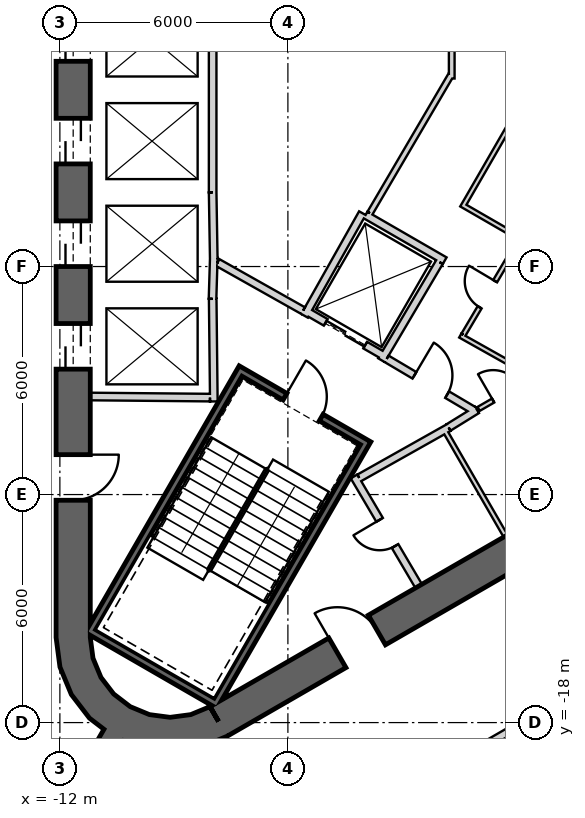
"""IFC4 building model, lengths in metres.
Left out: names, types, materials, properties, quantities, classifications, styles, units other than length and angle.
Written with IfcOpenShell. Run it as: python <this file> out.ifc"""

import sys

from ifc_helpers import new_model, si_unit, direction, frame, frame_2d, origin, place, context, subcontext, project, spatial, polyline, rectangle, outline, extrude, element, fill, save


model = new_model("IFC4")
c1 = context("Model", 3, precision=1e-05, world=origin(), true_north=direction((0.0, 1.0)))
c2 = subcontext(c1, "Body", "Model", "MODEL_VIEW")
j1 = project(units=[si_unit("LENGTHUNIT", "METRE"), si_unit("PLANEANGLEUNIT", "RADIAN")], contexts=[c1])
p1 = place(None, origin())
s1 = spatial("IfcSite", under=j1, at=p1, CompositionType="ELEMENT")
p2 = place(p1, origin())
s2 = spatial("IfcBuilding", under=s1, at=p2, CompositionType="ELEMENT")
p3 = place(p2, frame((0.0, 0.0, 310.4)))
s3 = spatial("IfcBuildingStorey", under=s2, at=p3, CompositionType="ELEMENT", Elevation=310.4)
p4 = place(p3, frame((-11.65, 15.762, 0.0), z_axis=(0.0, 0.0, 1.0), x_axis=(0.0, -1.0, 0.0)))
e1 = element("IfcWall", 1, at=p4, inside=s3, PredefinedType="SHEAR", context=c2, shape_type="SweptSolid", body=[
    extrude(rectangle(XDim=31.523, YDim=0.9, at=frame_2d((15.762, 0.0))), origin(), (0.0, 0.0, 1.0), 3.9),
])
p5 = place(p4, frame((7.062, 0.0, 0.0)))
e2 = element("IfcOpeningElement", 2, at=p5, cuts=e1, PredefinedType="OPENING", context=c2, shape_type="SweptSolid", body=[
    extrude(rectangle(XDim=1.2, YDim=2.4, at=frame_2d((0.6, 1.2))), frame((0.0, 0.46, 0.0), z_axis=(0.0, -1.0, 0.0), x_axis=(1.0, 0.0, 0.0)), (0.0, 0.0, 1.0), 0.92),
])
p6 = place(p4, frame((9.762, 0.0, 0.0)))
e3 = element("IfcOpeningElement", 3, at=p6, cuts=e1, PredefinedType="OPENING", context=c2, shape_type="SweptSolid", body=[
    extrude(rectangle(XDim=1.2, YDim=2.4, at=frame_2d((0.6, 1.2))), frame((0.0, 0.46, 0.0), z_axis=(0.0, -1.0, 0.0), x_axis=(1.0, 0.0, 0.0)), (0.0, 0.0, 1.0), 0.92),
])
p7 = place(p4, frame((12.462, 0.0, 0.0)))
e4 = element("IfcOpeningElement", 4, at=p7, cuts=e1, PredefinedType="OPENING", context=c2, shape_type="SweptSolid", body=[
    extrude(rectangle(XDim=1.2, YDim=2.4, at=frame_2d((0.6, 1.2))), frame((0.0, 0.46, 0.0), z_axis=(0.0, -1.0, 0.0), x_axis=(1.0, 0.0, 0.0)), (0.0, 0.0, 1.0), 0.92),
])
p8 = place(p4, frame((15.162, 0.0, 0.0)))
e5 = element("IfcOpeningElement", 5, at=p8, cuts=e1, PredefinedType="OPENING", context=c2, shape_type="SweptSolid", body=[
    extrude(rectangle(XDim=1.2, YDim=2.4, at=frame_2d((0.6, 1.2))), frame((0.0, 0.46, 0.0), z_axis=(0.0, -1.0, 0.0), x_axis=(1.0, 0.0, 0.0)), (0.0, 0.0, 1.0), 0.92),
])
p9 = place(p4, frame((17.862, 0.0, 0.0)))
e6 = element("IfcOpeningElement", 6, at=p9, cuts=e1, PredefinedType="OPENING", context=c2, shape_type="SweptSolid", body=[
    extrude(rectangle(XDim=1.2, YDim=2.4, at=frame_2d((0.6, 1.2))), frame((0.0, 0.46, 0.0), z_axis=(0.0, -1.0, 0.0), x_axis=(1.0, 0.0, 0.0)), (0.0, 0.0, 1.0), 0.92),
])
p10 = place(p4, frame((20.562, 0.0, 0.0)))
e7 = element("IfcOpeningElement", 7, at=p10, cuts=e1, PredefinedType="OPENING", context=c2, shape_type="SweptSolid", body=[
    extrude(rectangle(XDim=1.2, YDim=2.4, at=frame_2d((0.6, 1.2))), frame((0.0, 0.46, 0.0), z_axis=(0.0, -1.0, 0.0), x_axis=(1.0, 0.0, 0.0)), (0.0, 0.0, 1.0), 0.92),
])
p11 = place(p4, frame((23.262, 0.0, 0.0)))
e8 = element("IfcOpeningElement", 8, at=p11, cuts=e1, PredefinedType="OPENING", context=c2, shape_type="SweptSolid", body=[
    extrude(rectangle(XDim=1.2, YDim=2.4, at=frame_2d((0.6, 1.2))), frame((0.0, 0.46, 0.0), z_axis=(0.0, -1.0, 0.0), x_axis=(1.0, 0.0, 0.0)), (0.0, 0.0, 1.0), 0.92),
])
p12 = place(p4, frame((3.612, 0.0, 0.0)))
e9 = element("IfcOpeningElement", 9, at=p12, cuts=e1, PredefinedType="OPENING", context=c2, shape_type="SweptSolid", body=[
    extrude(rectangle(XDim=1.2, YDim=2.4, at=frame_2d((0.6, 1.2))), frame((0.0, 0.46, 0.0), z_axis=(0.0, -1.0, 0.0), x_axis=(1.0, 0.0, 0.0)), (0.0, 0.0, 1.0), 0.92),
])
p13 = place(p4, frame((26.712, 0.0, 0.0)))
e10 = element("IfcOpeningElement", 10, at=p13, cuts=e1, PredefinedType="OPENING", context=c2, shape_type="SweptSolid", body=[
    extrude(rectangle(XDim=1.2, YDim=2.4, at=frame_2d((0.6, 1.2))), frame((0.0, 0.46, 0.0), z_axis=(0.0, -1.0, 0.0), x_axis=(1.0, 0.0, 0.0)), (0.0, 0.0, 1.0), 0.92),
])
p14 = place(p3, frame((-7.825, -17.97, 0.0), z_axis=(0.0, 0.0, 1.0), x_axis=(0.866028369851, 0.499994862586, 0.0)))
e11 = element("IfcWall", 11, at=p14, inside=s3, PredefinedType="SHEAR", context=c2, shape_type="SweptSolid", body=[
    extrude(rectangle(XDim=31.523, YDim=0.9, at=frame_2d((15.762, 0.0))), origin(), (0.0, 0.0, 1.0), 3.9),
])
p15 = place(p14, frame((17.862, 0.0, 0.0)))
e12 = element("IfcOpeningElement", 12, at=p15, cuts=e11, PredefinedType="OPENING", context=c2, shape_type="SweptSolid", body=[
    extrude(rectangle(XDim=1.2, YDim=2.4, at=frame_2d((0.6, 1.2))), frame((0.0, 0.46, 0.0), z_axis=(0.0, -1.0, 0.0), x_axis=(1.0, 0.0, 0.0)), (0.0, 0.0, 1.0), 0.92),
])
p16 = place(p14, frame((20.562, 0.0, 0.0)))
e13 = element("IfcOpeningElement", 13, at=p16, cuts=e11, PredefinedType="OPENING", context=c2, shape_type="SweptSolid", body=[
    extrude(rectangle(XDim=1.2, YDim=2.4, at=frame_2d((0.6, 1.2))), frame((0.0, 0.46, 0.0), z_axis=(0.0, -1.0, 0.0), x_axis=(1.0, 0.0, 0.0)), (0.0, 0.0, 1.0), 0.92),
])
p17 = place(p14, frame((26.712, 0.0, 0.0)))
e14 = element("IfcOpeningElement", 14, at=p17, cuts=e11, PredefinedType="OPENING", context=c2, shape_type="SweptSolid", body=[
    extrude(rectangle(XDim=1.2, YDim=2.4, at=frame_2d((0.6, 1.2))), frame((0.0, 0.46, 0.0), z_axis=(0.0, -1.0, 0.0), x_axis=(1.0, 0.0, 0.0)), (0.0, 0.0, 1.0), 0.92),
])
p18 = place(p14, frame((3.612, 0.0, 0.0)))
e15 = element("IfcOpeningElement", 15, at=p18, cuts=e11, PredefinedType="OPENING", context=c2, shape_type="SweptSolid", body=[
    extrude(rectangle(XDim=1.2, YDim=2.4, at=frame_2d((0.6, 1.2))), frame((0.0, 0.46, 0.0), z_axis=(0.0, -1.0, 0.0), x_axis=(1.0, 0.0, 0.0)), (0.0, 0.0, 1.0), 0.92),
])
p19 = place(p3, origin())
e16 = element("IfcWall", 16, at=p19, inside=s3, PredefinedType="SHEAR", context=c2, shape_type="SweptSolid", body=[
    extrude(outline(polyline([(-12.1, -15.762), (-11.998, -16.538), (-11.698, -17.262), (-11.221, -17.883), (-10.6, -18.36), (-9.876, -18.659), (-9.1, -18.762), (-8.323, -18.659), (-7.6, -18.36), (-8.05, -17.58), (-8.556, -17.79), (-9.1, -17.862), (-9.644, -17.79), (-10.15, -17.58), (-10.585, -17.247), (-10.919, -16.812), (-11.128, -16.305), (-11.2, -15.762), (-12.1, -15.762)])), origin(), (0.0, 0.0, 1.0), 3.9),
])
p20 = place(p3, frame((-10.575, -18.316, 0.0), z_axis=(0.0, 0.0, 1.0), x_axis=(-0.500009446655, -0.866019949687, 0.0)))
e17 = element("IfcWall", 17, at=p20, inside=s3, PredefinedType="SHEAR", context=c2, shape_type="SweptSolid", body=[
    extrude(rectangle(XDim=9.254, YDim=0.6, at=frame_2d((4.627, 0.0))), origin(), (0.0, 0.0, 1.0), 3.9),
])
p21 = place(p20, frame((1.4, 0.0, 0.0)))
e18 = element("IfcOpeningElement", 18, at=p21, cuts=e17, PredefinedType="OPENING", context=c2, shape_type="SweptSolid", body=[
    extrude(rectangle(XDim=1.4, YDim=2.4, at=frame_2d((0.7, 1.2))), frame((0.0, 0.31, 0.0), z_axis=(0.0, -1.0, 0.0), x_axis=(1.0, 0.0, 0.0)), (0.0, 0.0, 1.0), 0.62),
])
p22 = place(p3, frame((-7.98, 4.05, 0.0), z_axis=(0.0, 0.0, 1.0), x_axis=(0.0, -1.0, 0.0)))
e19 = element("IfcWall", 19, at=p22, inside=s3, PredefinedType="PLUMBINGWALL", context=c2, shape_type="SweptSolid", body=[
    extrude(rectangle(XDim=8.1, YDim=0.2, at=frame_2d((4.05, 0.0))), origin(), (0.0, 0.0, 1.0), 3.6),
])
p23 = place(p3, frame((-7.95, -5.772, 0.0), z_axis=(0.0, 0.0, 1.0), x_axis=(-0.030803413295, -0.999525462272, 0.0)))
e20 = element("IfcWall", 20, at=p23, inside=s3, PredefinedType="PLUMBINGWALL", context=c2, shape_type="SweptSolid", body=[
    extrude(rectangle(XDim=1.078, YDim=0.2, at=frame_2d((0.539, 0.0))), origin(), (0.0, 0.0, 1.0), 3.6),
])
p24 = place(p3, frame((-7.98, -4.05, 0.0), z_axis=(0.0, 0.0, 1.0), x_axis=(0.016809909365, -0.999858703491, 0.0)))
e21 = element("IfcWall", 21, at=p24, inside=s3, PredefinedType="PLUMBINGWALL", context=c2, shape_type="SweptSolid", body=[
    extrude(rectangle(XDim=1.844, YDim=0.2, at=frame_2d((0.922, 0.0))), origin(), (0.0, 0.0, 1.0), 3.6),
])
p25 = place(p3, frame((-7.979, -6.85, 0.0), z_axis=(0.0, 0.0, 1.0), x_axis=(0.011121475088, -0.999938154483, 0.0)))
e22 = element("IfcWall", 22, at=p25, inside=s3, PredefinedType="PLUMBINGWALL", context=c2, shape_type="SweptSolid", body=[
    extrude(rectangle(XDim=2.7, YDim=0.2, at=frame_2d((1.35, 0.0))), origin(), (0.0, 0.0, 1.0), 3.6),
])
p26 = place(p3, frame((-8.05, -9.449, 0.0), z_axis=(0.0, 0.0, 1.0), x_axis=(-0.999957467379, 0.009222983926, 0.0)))
e23 = element("IfcWall", 23, at=p26, inside=s3, PredefinedType="PLUMBINGWALL", context=c2, shape_type="SweptSolid", body=[
    extrude(rectangle(XDim=3.15, YDim=0.2, at=frame_2d((1.575, 0.0))), origin(), (0.0, 0.0, 1.0), 3.6),
])
p27 = place(p3, frame((-3.905, -10.563, -0.3), z_axis=(0.0, 0.0, 1.0), x_axis=(-0.500012932018, -0.866017937352, 0.0)))
e24 = element("IfcWall", 24, at=p27, inside=s3, PredefinedType="SHEAR", context=c2, shape_type="SweptSolid", body=[
    extrude(rectangle(XDim=8.1, YDim=0.2, at=frame_2d((4.05, 0.0))), origin(), (0.0, 0.0, 1.0), 3.9),
])
p28 = place(p3, frame((-11.282, -15.541, -0.3), z_axis=(0.0, 0.0, 1.0), x_axis=(0.866000483506, -0.500043160704, 0.0)))
e25 = element("IfcWall", 25, at=p28, inside=s3, PredefinedType="SHEAR", context=c2, shape_type="SweptSolid", body=[
    extrude(rectangle(XDim=3.8, YDim=0.2, at=frame_2d((1.9, 0.0))), origin(), (0.0, 0.0, 1.0), 3.9),
])
p29 = place(p3, frame((-7.196, -8.663, -0.3), z_axis=(0.0, 0.0, 1.0), x_axis=(-0.499997992926, -0.866026562566, 0.0)))
e26 = element("IfcWall", 26, at=p29, inside=s3, PredefinedType="SHEAR", context=c2, shape_type="SweptSolid", body=[
    extrude(rectangle(XDim=7.9, YDim=0.2, at=frame_2d((3.95, 0.0))), origin(), (0.0, 0.0, 1.0), 3.9),
])
p30 = place(p3, frame((-4.041, -10.599, -0.3), z_axis=(0.0, 0.0, 1.0), x_axis=(-0.866047807691, 0.499961193289, 0.0)))
e27 = element("IfcWall", 27, at=p30, inside=s3, PredefinedType="SHEAR", context=c2, shape_type="SweptSolid", body=[
    extrude(rectangle(XDim=3.6, YDim=0.2, at=frame_2d((1.8, 0.0))), origin(), (0.0, 0.0, 1.0), 3.9),
])
p31 = place(p30, frame((1.25, 0.0, 0.3)))
e28 = element("IfcOpeningElement", 28, at=p31, cuts=e27, PredefinedType="OPENING", context=c2, shape_type="SweptSolid", body=[
    extrude(rectangle(XDim=1.1, YDim=2.1, at=frame_2d((0.55, 1.05))), frame((0.0, 0.11, 0.0), z_axis=(0.0, -1.0, 0.0), x_axis=(1.0, 0.0, 0.0)), (0.0, 0.0, 1.0), 0.22),
])
p32 = place(p3, frame((-3.446, -8.368, 0.0), z_axis=(0.0, 0.0, 1.0), x_axis=(-0.866024647952, 0.500001309137, 0.0)))
e29 = element("IfcWall", 29, at=p32, inside=s3, PredefinedType="PLUMBINGWALL", context=c2, shape_type="SweptSolid", body=[
    extrude(rectangle(XDim=2.4, YDim=0.2, at=frame_2d((1.2, 0.0))), origin(), (0.0, 0.0, 1.0), 3.6),
])
p33 = place(p32, frame((0.6, 0.0, 0.0)))
e30 = element("IfcOpeningElement", 30, at=p33, cuts=e29, PredefinedType="OPENING", context=c2, shape_type="SweptSolid", body=[
    extrude(rectangle(XDim=1.2, YDim=2.4, at=frame_2d((0.6, 1.2))), frame((0.0, 0.11, 0.0), z_axis=(0.0, -1.0, 0.0), x_axis=(1.0, 0.0, 0.0)), (0.0, 0.0, 1.0), 0.22),
])
p34 = place(p3, frame((-5.562, -7.296, 0.0), z_axis=(0.0, 0.0, 1.0), x_axis=(0.491322718731, 0.870977603649, 0.0)))
e31 = element("IfcWall", 31, at=p34, inside=s3, PredefinedType="PLUMBINGWALL", context=c2, shape_type="SweptSolid", body=[
    extrude(rectangle(XDim=3.1, YDim=0.2, at=frame_2d((1.55, 0.0))), origin(), (0.0, 0.0, 1.0), 3.6),
])
p35 = place(p3, frame((-3.957, -4.644, 0.0), z_axis=(0.0, 0.0, 1.0), x_axis=(0.865991127953, -0.500059362782, 0.0)))
e32 = element("IfcWall", 32, at=p35, inside=s3, PredefinedType="PLUMBINGWALL", context=c2, shape_type="SweptSolid", body=[
    extrude(rectangle(XDim=2.405, YDim=0.2, at=frame_2d((1.202, 0.0))), origin(), (0.0, 0.0, 1.0), 3.6),
])
p36 = place(p3, frame((-2.012, -5.882, 0.0), z_axis=(0.0, 0.0, 1.0), x_axis=(-0.508619639323, -0.860991325447, 0.0)))
e33 = element("IfcWall", 33, at=p36, inside=s3, PredefinedType="PLUMBINGWALL", context=c2, shape_type="SweptSolid", body=[
    extrude(rectangle(XDim=3.0, YDim=0.2, at=frame_2d((1.5, 0.0))), origin(), (0.0, 0.0, 1.0), 3.6),
])
p37 = place(p3, frame((-1.897, -10.275, 0.0), z_axis=(0.0, 0.0, 1.0), x_axis=(0.499984717929, -0.866034226713, 0.0)))
e34 = element("IfcWall", 34, at=p37, inside=s3, PredefinedType="PARTITIONING", context=c2, shape_type="SweptSolid", body=[
    extrude(rectangle(XDim=3.25, YDim=0.12, at=frame_2d((1.625, 0.0))), origin(), (0.0, 0.0, 1.0), 3.6),
])
p38 = place(p3, frame((-4.26, -11.524, 0.0), z_axis=(0.0, 0.0, 1.0), x_axis=(0.507997497166, -0.861358544901, 0.0)))
e35 = element("IfcWall", 35, at=p38, inside=s3, PredefinedType="PARTITIONING", context=c2, shape_type="SweptSolid", body=[
    extrude(rectangle(XDim=3.35, YDim=0.2, at=frame_2d((1.675, 0.0))), origin(), (0.0, 0.0, 1.0), 3.6),
])
p39 = place(p38, frame((1.325, 0.0, 0.0)))
e36 = element("IfcOpeningElement", 36, at=p39, cuts=e35, PredefinedType="OPENING", context=c2, shape_type="SweptSolid", body=[
    extrude(rectangle(XDim=0.8, YDim=2.1, at=frame_2d((0.4, 1.05))), frame((0.0, 0.11, 0.0), z_axis=(0.0, -1.0, 0.0), x_axis=(1.0, 0.0, 0.0)), (0.0, 0.0, 1.0), 0.22),
])
p40 = place(p3, frame((-1.769, -10.237, 0.0), z_axis=(0.0, 0.0, 1.0), x_axis=(-0.871534483978, -0.490334215854, 0.0)))
e37 = element("IfcWall", 37, at=p40, inside=s3, PredefinedType="PARTITIONING", context=c2, shape_type="SweptSolid", body=[
    extrude(rectangle(XDim=2.7, YDim=0.2, at=frame_2d((1.35, 0.0))), origin(), (0.0, 0.0, 1.0), 3.6),
])
p41 = place(p3, frame((-1.024, -9.771, 0.0), z_axis=(0.0, 0.0, 1.0), x_axis=(-0.850348075135, -0.526220629693, 0.0)))
e38 = element("IfcWall", 38, at=p41, inside=s3, PredefinedType="PARTITIONING", context=c2, shape_type="SweptSolid", body=[
    extrude(rectangle(XDim=0.878, YDim=0.2, at=frame_2d((0.439, 0.0))), origin(), (0.0, 0.0, 1.0), 3.6),
])
p42 = place(p3, frame((0.493, -8.895, 0.0), z_axis=(0.0, 0.0, 1.0), x_axis=(-0.866027945518, -0.499995597562, 0.0)))
e39 = element("IfcWall", 39, at=p42, inside=s3, PredefinedType="PARTITIONING", context=c2, shape_type="SweptSolid", body=[
    extrude(rectangle(XDim=1.702, YDim=0.12, at=frame_2d((0.851, 0.0))), origin(), (0.0, 0.0, 1.0), 3.6),
])
p43 = place(p42, frame((0.461, 0.0, 0.0)))
e40 = element("IfcOpeningElement", 40, at=p43, cuts=e39, PredefinedType="OPENING", context=c2, shape_type="SweptSolid", body=[
    extrude(rectangle(XDim=0.8, YDim=2.1, at=frame_2d((0.4, 1.05))), frame((0.0, 0.07, 0.0), z_axis=(0.0, -1.0, 0.0), x_axis=(1.0, 0.0, 0.0)), (0.0, 0.0, 1.0), 0.14),
])
p44 = place(p3, frame((-7.849, -5.894, 0.0), z_axis=(0.0, 0.0, 1.0), x_axis=(0.871340486379, -0.490678873396, 0.0)))
e41 = element("IfcWall", 41, at=p44, inside=s3, PredefinedType="PARTITIONING", context=c2, shape_type="SweptSolid", body=[
    extrude(rectangle(XDim=2.581, YDim=0.2, at=frame_2d((1.291, 0.0))), origin(), (0.0, 0.0, 1.0), 3.6),
])
p45 = place(p3, frame((-3.401, -8.43, 0.0), z_axis=(0.0, 0.0, 1.0), x_axis=(0.860617791406, -0.509251428192, 0.0)))
e42 = element("IfcWall", 42, at=p45, inside=s3, PredefinedType="PARTITIONING", context=c2, shape_type="SweptSolid", body=[
    extrude(rectangle(XDim=2.709, YDim=0.2, at=frame_2d((1.354, 0.0))), origin(), (0.0, 0.0, 1.0), 3.6),
])
p46 = place(p45, frame((0.848, 0.0, 0.0)))
e43 = element("IfcOpeningElement", 43, at=p46, cuts=e42, PredefinedType="OPENING", context=c2, shape_type="SweptSolid", body=[
    extrude(rectangle(XDim=1.0, YDim=2.1, at=frame_2d((0.5, 1.05))), frame((0.0, 0.11, 0.0), z_axis=(0.0, -1.0, 0.0), x_axis=(1.0, 0.0, 0.0)), (0.0, 0.0, 1.0), 0.22),
])
p47 = place(p3, frame((-1.689, -1.053, 0.0), z_axis=(0.0, 0.0, 1.0), x_axis=(0.0, 1.0, 0.0)))
e44 = element("IfcWall", 44, at=p47, inside=s3, PredefinedType="PLUMBINGWALL", context=c2, shape_type="SweptSolid", body=[
    extrude(rectangle(XDim=1.954, YDim=0.15, at=frame_2d((0.977, 0.0))), origin(), (0.0, 0.0, 1.0), 3.6),
])
p48 = place(p3, frame((-3.841, -4.595, 0.0), z_axis=(0.0, 0.0, 1.0), x_axis=(0.505857207696, 0.862617229959, 0.0)))
e45 = element("IfcWall", 45, at=p48, inside=s3, PredefinedType="PLUMBINGWALL", context=c2, shape_type="SweptSolid", body=[
    extrude(rectangle(XDim=4.231, YDim=0.15, at=frame_2d((2.116, 0.0))), origin(), (0.0, 0.0, 1.0), 3.6),
])
p49 = place(p3, frame((-1.464, -7.816, 0.0), z_axis=(0.0, 0.0, 1.0), x_axis=(0.871859859416, -0.489755434416, 0.0)))
e46 = element("IfcWall", 46, at=p49, inside=s3, PredefinedType="PARTITIONING", context=c2, shape_type="SweptSolid", body=[
    extrude(rectangle(XDim=2.155, YDim=0.12, at=frame_2d((1.077, 0.0))), origin(), (0.0, 0.0, 1.0), 3.6),
])
p50 = place(p3, frame((-0.119, -5.664, 0.0), z_axis=(0.0, 0.0, 1.0), x_axis=(-0.509948384343, -0.860205001907, 0.0)))
e47 = element("IfcWall", 47, at=p50, inside=s3, PredefinedType="PARTITIONING", context=c2, shape_type="SweptSolid", body=[
    extrude(rectangle(XDim=2.475, YDim=0.12, at=frame_2d((1.238, 0.0))), origin(), (0.0, 0.0, 1.0), 3.6),
])
p51 = place(p50, frame((0.838, 0.0, 0.0)))
e48 = element("IfcOpeningElement", 48, at=p51, cuts=e47, PredefinedType="OPENING", context=c2, shape_type="SweptSolid", body=[
    extrude(rectangle(XDim=0.8, YDim=2.1, at=frame_2d((0.4, 1.05))), frame((0.0, 0.07, 0.0), z_axis=(0.0, -1.0, 0.0), x_axis=(1.0, 0.0, 0.0)), (0.0, 0.0, 1.0), 0.14),
])
p52 = place(p3, frame((-1.436, -4.367, 0.0), z_axis=(0.0, 0.0, 1.0), x_axis=(0.866087547558, -0.499892348375, 0.0)))
e49 = element("IfcWall", 49, at=p52, inside=s3, PredefinedType="PARTITIONING", context=c2, shape_type="SweptSolid", body=[
    extrude(rectangle(XDim=1.7, YDim=0.12, at=frame_2d((0.85, 0.0))), origin(), (0.0, 0.0, 1.0), 3.6),
])
p53 = place(p3, frame((0.095, -1.835, 0.0), z_axis=(0.0, 0.0, 1.0), x_axis=(-0.499980071345, -0.866036909293, 0.0)))
e50 = element("IfcWall", 50, at=p53, inside=s3, PredefinedType="PARTITIONING", context=c2, shape_type="SweptSolid", body=[
    extrude(rectangle(XDim=2.898, YDim=0.12, at=frame_2d((1.449, 0.0))), origin(), (0.0, 0.0, 1.0), 3.6),
])
p54 = place(p3, frame((-6.505, -21.885, 0.0), z_axis=(0.0, 0.0, 1.0), x_axis=(0.8660236234, 0.500003083703, 0.0)))
e51 = element("IfcWall", 51, at=p54, inside=s3, PredefinedType="PARTITIONING", context=c2, shape_type="SweptSolid", body=[
    extrude(rectangle(XDim=9.188, YDim=0.2, at=frame_2d((4.594, 0.0))), origin(), (0.0, 0.0, 1.0), 2.88),
])
p55 = place(p54, frame((4.132, 0.0, 0.0)))
e52 = element("IfcOpeningElement", 52, at=p55, cuts=e51, PredefinedType="OPENING", context=c2, shape_type="SweptSolid", body=[
    extrude(rectangle(XDim=1.0, YDim=2.1, at=frame_2d((0.5, 1.05))), frame((0.0, 0.11, 0.0), z_axis=(0.0, -1.0, 0.0), x_axis=(1.0, 0.0, 0.0)), (0.0, 0.0, 1.0), 0.22),
])
p56 = place(p31, origin())
e53 = element("IfcDoor", 53, at=p56, inside=s3, OperationType="SINGLE_SWING_LEFT", PredefinedType="USERDEFINED", context=c2, shape_type="SweptSolid", body=[
    extrude(rectangle(XDim=1.1, YDim=2.1, at=frame_2d((0.55, 1.05))), frame((0.0, 0.025, 0.0), z_axis=(0.0, -1.0, 0.0), x_axis=(1.0, 0.0, 0.0)), (0.0, 0.0, 1.0), 0.05),
])
fill(e28, e53)
p57 = place(p46, origin())
e54 = element("IfcDoor", 54, at=p57, inside=s3, OperationType="SINGLE_SWING_LEFT", PredefinedType="USERDEFINED", context=c2, shape_type="SweptSolid", body=[
    extrude(rectangle(XDim=1.0, YDim=2.1, at=frame_2d((0.5, 1.05))), frame((0.0, 0.025, 0.0), z_axis=(0.0, -1.0, 0.0), x_axis=(1.0, 0.0, 0.0)), (0.0, 0.0, 1.0), 0.05),
])
fill(e43, e54)
p58 = place(p33, origin())
e55 = element("IfcDoor", 55, at=p58, inside=s3, OperationType="SLIDING_TO_LEFT", PredefinedType="USERDEFINED", context=c2, shape_type="SweptSolid", body=[
    extrude(rectangle(XDim=1.2, YDim=2.4, at=frame_2d((0.6, 1.2))), frame((0.0, 0.025, 0.0), z_axis=(0.0, -1.0, 0.0), x_axis=(1.0, 0.0, 0.0)), (0.0, 0.0, 1.0), 0.05),
])
fill(e30, e55)
p59 = place(p51, origin())
e56 = element("IfcDoor", 56, at=p59, inside=s3, OperationType="SINGLE_SWING_RIGHT", PredefinedType="USERDEFINED", context=c2, shape_type="SweptSolid", body=[
    extrude(rectangle(XDim=0.8, YDim=2.1, at=frame_2d((0.4, 1.05))), frame((0.0, 0.025, 0.0), z_axis=(0.0, -1.0, 0.0), x_axis=(1.0, 0.0, 0.0)), (0.0, 0.0, 1.0), 0.05),
])
fill(e48, e56)
p60 = place(p39, origin())
e57 = element("IfcDoor", 57, at=p60, inside=s3, OperationType="SINGLE_SWING_LEFT", PredefinedType="USERDEFINED", context=c2, shape_type="SweptSolid", body=[
    extrude(rectangle(XDim=0.8, YDim=2.1, at=frame_2d((0.4, 1.05))), frame((0.0, 0.025, 0.0), z_axis=(0.0, -1.0, 0.0), x_axis=(1.0, 0.0, 0.0)), (0.0, 0.0, 1.0), 0.05),
])
fill(e36, e57)
p61 = place(p43, origin())
e58 = element("IfcDoor", 58, at=p61, inside=s3, OperationType="SINGLE_SWING_LEFT", PredefinedType="USERDEFINED", context=c2, shape_type="SweptSolid", body=[
    extrude(rectangle(XDim=0.8, YDim=2.1, at=frame_2d((0.4, 1.05))), frame((0.0, 0.025, 0.0), z_axis=(0.0, -1.0, 0.0), x_axis=(1.0, 0.0, 0.0)), (0.0, 0.0, 1.0), 0.05),
])
fill(e40, e58)
p62 = place(p8, origin())
e59 = element("IfcDoor", 59, at=p62, inside=s3, OperationType="SLIDING_TO_LEFT", PredefinedType="USERDEFINED", context=c2, shape_type="SweptSolid", body=[
    extrude(rectangle(XDim=1.2, YDim=2.4, at=frame_2d((0.6, 1.2))), frame((0.0, 0.025, 0.0), z_axis=(0.0, -1.0, 0.0), x_axis=(1.0, 0.0, 0.0)), (0.0, 0.0, 1.0), 0.05),
])
fill(e5, e59)
p63 = place(p9, origin())
e60 = element("IfcDoor", 60, at=p63, inside=s3, OperationType="SLIDING_TO_LEFT", PredefinedType="USERDEFINED", context=c2, shape_type="SweptSolid", body=[
    extrude(rectangle(XDim=1.2, YDim=2.4, at=frame_2d((0.6, 1.2))), frame((0.0, 0.025, 0.0), z_axis=(0.0, -1.0, 0.0), x_axis=(1.0, 0.0, 0.0)), (0.0, 0.0, 1.0), 0.05),
])
fill(e6, e60)
p64 = place(p10, origin())
e61 = element("IfcDoor", 61, at=p64, inside=s3, OperationType="SLIDING_TO_LEFT", PredefinedType="USERDEFINED", context=c2, shape_type="SweptSolid", body=[
    extrude(rectangle(XDim=1.2, YDim=2.4, at=frame_2d((0.6, 1.2))), frame((0.0, 0.025, 0.0), z_axis=(0.0, -1.0, 0.0), x_axis=(1.0, 0.0, 0.0)), (0.0, 0.0, 1.0), 0.05),
])
fill(e7, e61)
p65 = place(p11, origin())
e62 = element("IfcDoor", 62, at=p65, inside=s3, OperationType="SLIDING_TO_LEFT", PredefinedType="USERDEFINED", context=c2, shape_type="SweptSolid", body=[
    extrude(rectangle(XDim=1.2, YDim=2.4, at=frame_2d((0.6, 1.2))), frame((0.0, 0.025, 0.0), z_axis=(0.0, -1.0, 0.0), x_axis=(1.0, 0.0, 0.0)), (0.0, 0.0, 1.0), 0.05),
])
fill(e8, e62)
p66 = place(p13, origin())
e63 = element("IfcDoor", 63, at=p66, inside=s3, OperationType="SINGLE_SWING_RIGHT", PredefinedType="USERDEFINED", context=c2, shape_type="SweptSolid", body=[
    extrude(rectangle(XDim=1.2, YDim=2.4, at=frame_2d((0.6, 1.2))), frame((0.0, 0.025, 0.0), z_axis=(0.0, -1.0, 0.0), x_axis=(1.0, 0.0, 0.0)), (0.0, 0.0, 1.0), 0.05),
])
fill(e10, e63)
p67 = place(p18, origin())
e64 = element("IfcDoor", 64, at=p67, inside=s3, OperationType="SINGLE_SWING_LEFT", PredefinedType="USERDEFINED", context=c2, shape_type="SweptSolid", body=[
    extrude(rectangle(XDim=1.2, YDim=2.4, at=frame_2d((0.6, 1.2))), frame((0.0, 0.025, 0.0), z_axis=(0.0, -1.0, 0.0), x_axis=(1.0, 0.0, 0.0)), (0.0, 0.0, 1.0), 0.05),
])
fill(e15, e64)
save(model, sys.argv[1])
